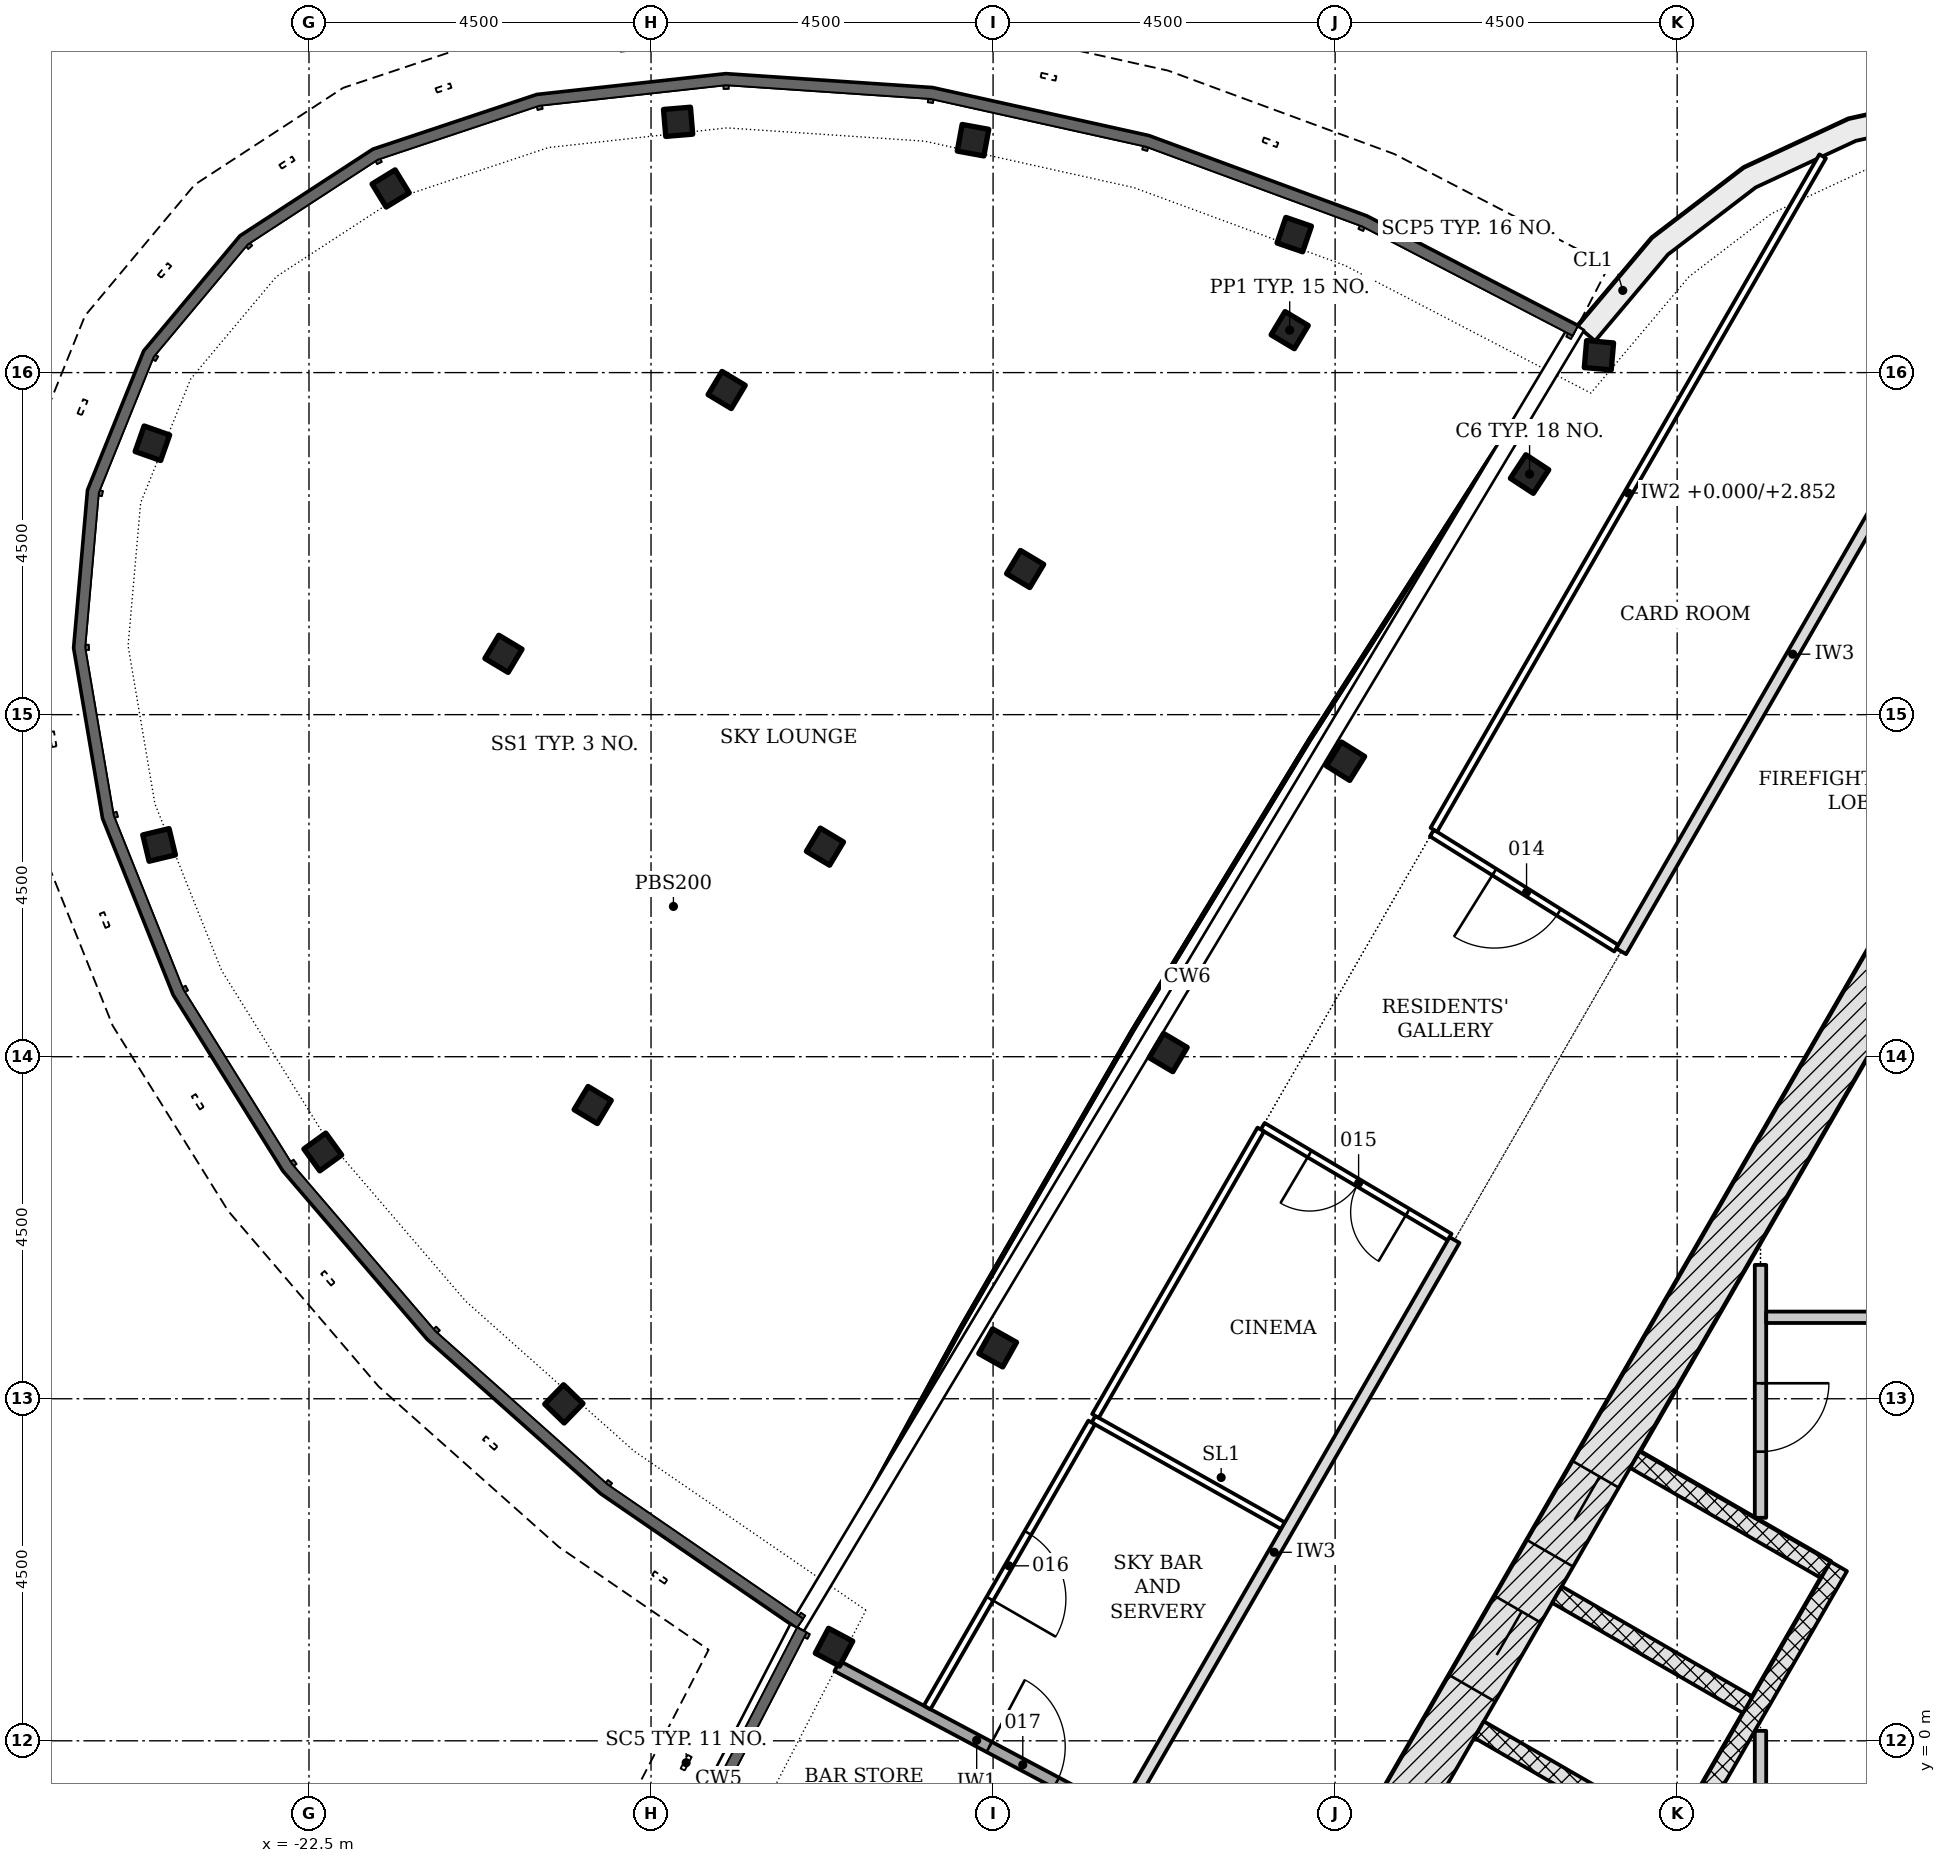
"""IFC4 building model, lengths in metres.
Left out: names, types, materials, properties, quantities, classifications, styles, units other than length and angle.
Written with IfcOpenShell. Run it as: python <this file> out.ifc"""

import sys

from ifc_helpers import new_model, si_unit, direction, frame, frame_2d, origin, origin_2d, place, context, subcontext, project, spatial, polyline, rectangle, hollow_rectangle, i_section, outline, extrude, element, fill, save


model = new_model("IFC4")
c1 = context("Model", 3, precision=1e-05, world=origin(), true_north=direction((0.0, 1.0)))
c2 = subcontext(c1, "Body", "Model", "MODEL_VIEW")
j1 = project(units=[si_unit("LENGTHUNIT", "METRE"), si_unit("PLANEANGLEUNIT", "RADIAN")], contexts=[c1])
p1 = place(None, origin())
s1 = spatial("IfcSite", under=j1, at=p1, CompositionType="ELEMENT")
p2 = place(p1, origin())
s2 = spatial("IfcBuilding", under=s1, at=p2, CompositionType="ELEMENT")
p3 = place(p2, frame((0.0, 0.0, 263.4)))
s3 = spatial("IfcBuildingStorey", under=s2, at=p3, CompositionType="ELEMENT", Elevation=263.4)
p4 = place(p3, frame((-1.083, 11.281, -0.2), z_axis=(0.0, 0.0, 1.0), x_axis=(-0.500001446645, -0.866024568562, 0.0)))
e1 = element("IfcWall", 1, at=p4, inside=s3, PredefinedType="SHEAR", context=c2, shape_type="SweptSolid", body=[
    extrude(rectangle(XDim=18.458, YDim=0.7, at=frame_2d((9.229, 0.0))), origin(), (0.0, 0.0, 1.0), 3.6),
])
p5 = place(p4, frame((8.979, 0.0, 0.2)))
e2 = element("IfcOpeningElement", 2, at=p5, cuts=e1, PredefinedType="OPENING", context=c2, shape_type="SweptSolid", body=[
    extrude(rectangle(XDim=1.2, YDim=2.1, at=frame_2d((0.6, 1.05))), frame((0.0, 0.36, 0.0), z_axis=(0.0, -1.0, 0.0), x_axis=(1.0, 0.0, 0.0)), (0.0, 0.0, 1.0), 0.72),
])
p6 = place(p4, frame((11.029, 0.0, 0.2)))
e3 = element("IfcOpeningElement", 3, at=p6, cuts=e1, PredefinedType="OPENING", context=c2, shape_type="SweptSolid", body=[
    extrude(rectangle(XDim=1.2, YDim=2.1, at=frame_2d((0.6, 1.05))), frame((0.0, 0.36, 0.0), z_axis=(0.0, -1.0, 0.0), x_axis=(1.0, 0.0, 0.0)), (0.0, 0.0, 1.0), 0.72),
])
for number, where, z_axis, x_axis in (
    (4, (-6.442, 16.666, -0.2), (0.0, 0.0, 1.0), (-0.549, -0.836, 0.0)),
    (5, (-8.863, 12.888, -0.2), (0.0, 0.0, 1.0), (-0.53, -0.848, 0.0)),
    (6, (-11.196, 9.055, -0.2), (0.0, 0.0, 1.0), (-0.51, -0.86, 0.0)),
    (7, (-13.44, 5.169, -0.2), (0.0, 0.0, 1.0), (-0.49, -0.872, 0.0)),
    (8, (-15.593, 1.232, -0.2), (0.0, 0.0, 1.0), (-0.47, -0.883, 0.0)),
):
    element("IfcColumn", number, at=place(p3, frame(where, z_axis=z_axis, x_axis=x_axis)), inside=s3, PredefinedType="COLUMN", context=c2, shape_type="SweptSolid", body=[
        extrude(i_section(OverallWidth=0.371, OverallDepth=0.361, WebThickness=0.012, FlangeThickness=0.02, FilletRadius=0.015, at=origin_2d()), origin(), (0.0, 0.0, 1.0), 3.6),
    ])
for number, where, z_axis, x_axis in (
    (9, (-9.598, 18.558, -0.2), (0.0, 0.0, 1.0), (-0.858, 0.514, 0.0)),
    (10, (-13.078, 15.416, -0.2), (0.0, 0.0, 1.0), (-0.858, 0.514, 0.0)),
    (11, (-17.005, 17.771, -0.2), (0.0, 0.0, 1.0), (-0.858, 0.514, 0.0)),
    (12, (-15.712, 11.763, -0.2), (0.0, 0.0, 1.0), (-0.858, 0.514, 0.0)),
    (13, (-19.941, 14.3, -0.2), (0.0, 0.0, 1.0), (-0.858, 0.514, 0.0)),
    (14, (-18.768, 8.365, -0.2), (0.0, 0.0, 1.0), (-0.858, 0.514, 0.0)),
    (15, (-5.529, 18.228, -0.2), (0.0, 0.0, 1.0), (-0.996, 0.086, 0.0)),
    (16, (-9.538, 19.816, -0.2), (0.0, 0.0, 1.0), (-0.946, 0.325, 0.0)),
    (17, (-13.764, 21.057, -0.2), (0.0, 0.0, 1.0), (-0.984, 0.18, 0.0)),
    (18, (-17.644, 21.3, -0.2), (0.0, 0.0, 1.0), (-0.997, -0.083, 0.0)),
    (19, (-21.426, 20.423, -0.2), (0.0, 0.0, 1.0), (-0.853, -0.522, 0.0)),
    (20, (-24.56, 17.071, -0.2), (0.0, 0.0, 1.0), (-0.333, -0.943, 0.0)),
    (21, (-24.472, 11.786, -0.2), (0.0, 0.0, 1.0), (0.234, -0.972, 0.0)),
    (22, (-22.319, 7.747, -0.2), (0.0, 0.0, 1.0), (0.587, -0.81, 0.0)),
    (23, (-19.147, 4.433, -0.2), (0.0, 0.0, 1.0), (0.718, -0.696, 0.0)),
):
    element("IfcColumn", number, at=place(p3, frame(where, z_axis=z_axis, x_axis=x_axis)), inside=s3, PredefinedType="COLUMN", context=c2, shape_type="SweptSolid", body=[
        extrude(hollow_rectangle(XDim=0.356, YDim=0.356, WallThickness=0.013, at=origin_2d()), origin(), (0.0, 0.0, 1.0), 3.6),
    ])
p7 = place(p3, origin())
e24 = element("IfcWall", 24, at=p7, inside=s3, PredefinedType="NOTDEFINED", context=c2, shape_type="SweptSolid", body=[
    extrude(outline(polyline([(6.901, 16.968), (5.81, 18.61), (4.83, 19.771), (3.623, 20.695), (2.244, 21.335), (0.76, 21.664), (-0.76, 21.664), (-2.244, 21.335), (-3.623, 20.695), (-4.83, 19.771), (-5.81, 18.61), (-5.58, 18.416), (-4.622, 19.553), (-3.466, 20.437), (-2.147, 21.05), (-0.727, 21.364), (0.727, 21.364), (2.147, 21.05), (3.466, 20.437), (4.622, 19.553), (5.569, 18.429), (6.651, 16.802), (6.901, 16.968)])), origin(), (0.0, 0.0, 1.0), 3.3),
])
for number, where, z_axis, x_axis in (
    (25, (-5.056, 3.699, -0.2), (0.0, 0.0, 1.0), (0.866, -0.5, 0.0)),
    (26, (-6.081, 1.923, -0.2), (0.0, 0.0, 1.0), (0.866, -0.5, 0.0)),
    (27, (-7.106, 0.148, -0.2), (0.0, 0.0, 1.0), (0.866, -0.5, 0.0)),
):
    element("IfcWall", number, at=place(p3, frame(where, z_axis=z_axis, x_axis=x_axis)), inside=s3, PredefinedType="PARTITIONING", context=c2, shape_type="SweptSolid", body=[
        extrude(rectangle(XDim=2.9, YDim=0.25, at=frame_2d((1.45, 0.0))), origin(), (0.0, 0.0, 1.0), 3.6),
    ])
p8 = place(p3, frame((-2.374, 2.294, 0.0), z_axis=(0.0, 0.0, 1.0), x_axis=(-0.500003174267, -0.866023571113, 0.0)))
e28 = element("IfcWall", 28, at=p8, inside=s3, PredefinedType="PARTITIONING", context=c2, shape_type="SweptSolid", body=[
    extrude(rectangle(XDim=6.7, YDim=0.25, at=frame_2d((3.35, 0.0))), origin(), (0.0, 0.0, 1.0), 3.4),
])
p9 = place(p3, frame((-3.404, 0.131, 0.0), z_axis=(0.0, 0.0, 1.0), x_axis=(0.0, -1.0, 0.0)))
e29 = element("IfcWall", 29, at=p9, inside=s3, PredefinedType="PARTITIONING", context=c2, shape_type="SweptSolid", body=[
    extrude(rectangle(XDim=6.359, YDim=0.15, at=frame_2d((3.18, 0.0))), origin(), (0.0, 0.0, 1.0), 3.4),
])
p10 = place(p9, frame((1.281, 0.0, 0.0)))
e30 = element("IfcOpeningElement", 30, at=p10, cuts=e29, PredefinedType="OPENING", context=c2, shape_type="SweptSolid", body=[
    extrude(rectangle(XDim=0.9, YDim=2.1, at=frame_2d((0.45, 1.05))), frame((0.0, 0.085, 0.0), z_axis=(0.0, -1.0, 0.0), x_axis=(1.0, 0.0, 0.0)), (0.0, 0.0, 1.0), 0.17),
])
p11 = place(p3, frame((-3.404, 6.261, 0.0), z_axis=(0.0, 0.0, 1.0), x_axis=(0.0, -1.0, 0.0)))
e31 = element("IfcWall", 31, at=p11, inside=s3, PredefinedType="PARTITIONING", context=c2, shape_type="SweptSolid", body=[
    extrude(rectangle(XDim=3.327, YDim=0.15, at=frame_2d((1.664, 0.0))), origin(), (0.0, 0.0, 1.0), 3.4),
])
p12 = place(p11, frame((1.557, 0.0, 0.0)))
e32 = element("IfcOpeningElement", 32, at=p12, cuts=e31, PredefinedType="OPENING", context=c2, shape_type="SweptSolid", body=[
    extrude(rectangle(XDim=0.9, YDim=2.1, at=frame_2d((0.45, 1.05))), frame((0.0, 0.085, 0.0), z_axis=(0.0, -1.0, 0.0), x_axis=(1.0, 0.0, 0.0)), (0.0, 0.0, 1.0), 0.17),
])
p13 = place(p3, frame((-3.329, 5.572, 0.0), z_axis=(0.0, 0.0, 1.0), x_axis=(1.0, 0.0, 0.0)))
e33 = element("IfcWall", 33, at=p13, inside=s3, PredefinedType="PARTITIONING", context=c2, shape_type="SweptSolid", body=[
    extrude(rectangle(XDim=1.475, YDim=0.15, at=frame_2d((0.737, 0.0))), origin(), (0.0, 0.0, 1.0), 3.4),
])
p14 = place(p3, frame((-0.723, 18.205, 0.0), z_axis=(0.0, 0.0, 1.0), x_axis=(-0.500010391421, -0.866019404212, 0.0)))
e34 = element("IfcWall", 34, at=p14, inside=s3, PredefinedType="PARTITIONING", context=c2, shape_type="SweptSolid", body=[
    extrude(rectangle(XDim=9.028, YDim=0.15, at=frame_2d((4.514, 0.0))), origin(), (0.0, 0.0, 1.0), 2.852),
])
p15 = place(p3, frame((-7.429, 6.589, 0.0), z_axis=(0.0, 0.0, 1.0), x_axis=(-0.499994197604, -0.866028753773, 0.0)))
e35 = element("IfcWall", 35, at=p15, inside=s3, PredefinedType="PARTITIONING", context=c2, shape_type="SweptSolid", body=[
    extrude(rectangle(XDim=9.488, YDim=0.15, at=frame_2d((4.744, 0.0))), origin(), (0.0, 0.0, 1.0), 2.852),
])
p16 = place(p3, frame((-15.552, 0.984, 0.0), z_axis=(0.0, 0.0, 1.0), x_axis=(0.882898276856, -0.469564300947, 0.0)))
e36 = element("IfcWall", 36, at=p16, inside=s3, PredefinedType="PARTITIONING", context=c2, shape_type="SweptSolid", body=[
    extrude(rectangle(XDim=4.159, YDim=0.15, at=frame_2d((2.08, 0.0))), origin(), (0.0, 0.0, 1.0), 3.4),
])
p17 = place(p16, frame((2.267, 0.0, 0.0)))
e37 = element("IfcOpeningElement", 37, at=p17, cuts=e36, PredefinedType="OPENING", context=c2, shape_type="SweptSolid", body=[
    extrude(rectangle(XDim=1.0, YDim=2.1, at=frame_2d((0.5, 1.05))), frame((0.0, 0.085, 0.0), z_axis=(0.0, -1.0, 0.0), x_axis=(1.0, 0.0, 0.0)), (0.0, 0.0, 1.0), 0.17),
])
p18 = place(p3, frame((-5.3, 10.426, 0.0), z_axis=(0.0, 0.0, 1.0), x_axis=(-0.84806062783, 0.529899208835, 0.0)))
e38 = element("IfcWall", 38, at=p18, inside=s3, PredefinedType="PARTITIONING", context=c2, shape_type="SweptSolid", body=[
    extrude(rectangle(XDim=2.861, YDim=0.1, at=frame_2d((1.43, 0.0))), origin(), (0.0, 0.0, 1.0), 3.4),
])
p19 = place(p18, frame((0.893, 0.0, 0.0)))
e39 = element("IfcOpeningElement", 39, at=p19, cuts=e38, PredefinedType="OPENING", context=c2, shape_type="SweptSolid", body=[
    extrude(rectangle(XDim=1.0, YDim=2.1, at=frame_2d((0.5, 1.05))), frame((0.0, 0.06, 0.0), z_axis=(0.0, -1.0, 0.0), x_axis=(1.0, 0.0, 0.0)), (0.0, 0.0, 1.0), 0.12),
])
p20 = place(p3, frame((-7.494, 6.627, 0.0), z_axis=(0.0, 0.0, 1.0), x_axis=(-0.860170843297, 0.510006000299, 0.0)))
e40 = element("IfcWall", 40, at=p20, inside=s3, PredefinedType="PARTITIONING", context=c2, shape_type="SweptSolid", body=[
    extrude(rectangle(XDim=2.859, YDim=0.1, at=frame_2d((1.43, 0.0))), origin(), (0.0, 0.0, 1.0), 3.4),
])
p21 = place(p20, frame((0.642, 0.0, 0.0)))
e41 = element("IfcOpeningElement", 41, at=p21, cuts=e40, PredefinedType="OPENING", context=c2, shape_type="SweptSolid", body=[
    extrude(rectangle(XDim=1.5, YDim=2.1, at=frame_2d((0.75, 1.05))), frame((0.0, 0.06, 0.0), z_axis=(0.0, -1.0, 0.0), x_axis=(1.0, 0.0, 0.0)), (0.0, 0.0, 1.0), 0.12),
])
p22 = place(p3, frame((-9.686, 2.83, 0.0), z_axis=(0.0, 0.0, 1.0), x_axis=(-0.871778429479, 0.489900367315, 0.0)))
e42 = element("IfcWall", 42, at=p22, inside=s3, PredefinedType="PARTITIONING", context=c2, shape_type="SweptSolid", body=[
    extrude(rectangle(XDim=2.859, YDim=0.1, at=frame_2d((1.43, 0.0))), origin(), (0.0, 0.0, 1.0), 3.4),
])
p23 = place(p3, frame((-2.586, 20.846, 0.0), z_axis=(0.0, 0.0, 1.0), x_axis=(-0.499993724355, -0.866029026999, 0.0)))
e43 = element("IfcWall", 43, at=p23, inside=s3, PredefinedType="PARTITIONING", context=c2, shape_type="SweptSolid", body=[
    extrude(rectangle(XDim=10.232, YDim=0.1, at=frame_2d((5.116, 0.0))), origin(), (0.0, 0.0, 1.0), 2.852),
])
p24 = place(p3, frame((-9.978, 8.042, 0.0), z_axis=(0.0, 0.0, 1.0), x_axis=(-0.500007404367, -0.866021128829, 0.0)))
e44 = element("IfcWall", 44, at=p24, inside=s3, PredefinedType="PARTITIONING", context=c2, shape_type="SweptSolid", body=[
    extrude(rectangle(XDim=4.351, YDim=0.1, at=frame_2d((2.176, 0.0))), origin(), (0.0, 0.0, 1.0), 2.852),
])
p25 = place(p3, frame((-12.204, 4.187, 0.0), z_axis=(0.0, 0.0, 1.0), x_axis=(-0.499973093216, -0.866040937866, 0.0)))
e45 = element("IfcWall", 45, at=p25, inside=s3, PredefinedType="PARTITIONING", context=c2, shape_type="SweptSolid", body=[
    extrude(rectangle(XDim=4.328, YDim=0.1, at=frame_2d((2.164, 0.0))), origin(), (0.0, 0.0, 1.0), 2.852),
])
p26 = place(p25, frame((1.677, 0.0, 0.0)))
e46 = element("IfcOpeningElement", 46, at=p26, cuts=e45, PredefinedType="OPENING", context=c2, shape_type="SweptSolid", body=[
    extrude(rectangle(XDim=1.0, YDim=2.1, at=frame_2d((0.5, 1.05))), frame((0.0, 0.06, 0.0), z_axis=(0.0, -1.0, 0.0), x_axis=(1.0, 0.0, 0.0)), (0.0, 0.0, 1.0), 0.12),
])
p27 = place(p5, origin())
e47 = element("IfcDoor", 47, at=p27, inside=s3, OperationType="DOUBLE_DOOR_SLIDING", PredefinedType="DOOR", context=c2, shape_type="SweptSolid", body=[
    extrude(rectangle(XDim=1.2, YDim=2.1, at=frame_2d((0.6, 1.05))), frame((0.0, 0.025, 0.0), z_axis=(0.0, -1.0, 0.0), x_axis=(1.0, 0.0, 0.0)), (0.0, 0.0, 1.0), 0.05),
])
fill(e2, e47)
p28 = place(p6, origin())
e48 = element("IfcDoor", 48, at=p28, inside=s3, OperationType="DOUBLE_DOOR_SLIDING", PredefinedType="DOOR", context=c2, shape_type="SweptSolid", body=[
    extrude(rectangle(XDim=1.2, YDim=2.1, at=frame_2d((0.6, 1.05))), frame((0.0, 0.025, 0.0), z_axis=(0.0, -1.0, 0.0), x_axis=(1.0, 0.0, 0.0)), (0.0, 0.0, 1.0), 0.05),
])
fill(e3, e48)
p29 = place(p12, origin())
e49 = element("IfcDoor", 49, at=p29, inside=s3, OperationType="SINGLE_SWING_LEFT", PredefinedType="DOOR", context=c2, shape_type="SweptSolid", body=[
    extrude(rectangle(XDim=0.9, YDim=2.1, at=frame_2d((0.45, 1.05))), frame((0.0, 0.025, 0.0), z_axis=(0.0, -1.0, 0.0), x_axis=(1.0, 0.0, 0.0)), (0.0, 0.0, 1.0), 0.05),
])
fill(e32, e49)
p30 = place(p19, origin())
e50 = element("IfcDoor", 50, at=p30, inside=s3, OperationType="SINGLE_SWING_RIGHT", PredefinedType="DOOR", context=c2, shape_type="SweptSolid", body=[
    extrude(rectangle(XDim=1.0, YDim=2.1, at=frame_2d((0.5, 1.05))), frame((0.0, 0.025, 0.0), z_axis=(0.0, -1.0, 0.0), x_axis=(1.0, 0.0, 0.0)), (0.0, 0.0, 1.0), 0.05),
])
fill(e39, e50)
p31 = place(p21, origin())
e51 = element("IfcDoor", 51, at=p31, inside=s3, OperationType="DOUBLE_DOOR_SINGLE_SWING", PredefinedType="DOOR", context=c2, shape_type="SweptSolid", body=[
    extrude(rectangle(XDim=1.5, YDim=2.1, at=frame_2d((0.75, 1.05))), frame((0.0, 0.025, 0.0), z_axis=(0.0, -1.0, 0.0), x_axis=(1.0, 0.0, 0.0)), (0.0, 0.0, 1.0), 0.05),
])
fill(e41, e51)
p32 = place(p26, origin())
e52 = element("IfcDoor", 52, at=p32, inside=s3, OperationType="SINGLE_SWING_RIGHT", PredefinedType="DOOR", context=c2, shape_type="SweptSolid", body=[
    extrude(rectangle(XDim=1.0, YDim=2.1, at=frame_2d((0.5, 1.05))), frame((0.0, 0.025, 0.0), z_axis=(0.0, -1.0, 0.0), x_axis=(1.0, 0.0, 0.0)), (0.0, 0.0, 1.0), 0.05),
])
fill(e46, e52)
p33 = place(p17, origin())
e53 = element("IfcDoor", 53, at=p33, inside=s3, OperationType="SINGLE_SWING_LEFT", PredefinedType="DOOR", context=c2, shape_type="SweptSolid", body=[
    extrude(rectangle(XDim=1.0, YDim=2.1, at=frame_2d((0.5, 1.05))), frame((0.0, 0.025, 0.0), z_axis=(0.0, -1.0, 0.0), x_axis=(1.0, 0.0, 0.0)), (0.0, 0.0, 1.0), 0.05),
])
fill(e37, e53)
save(model, sys.argv[1])
